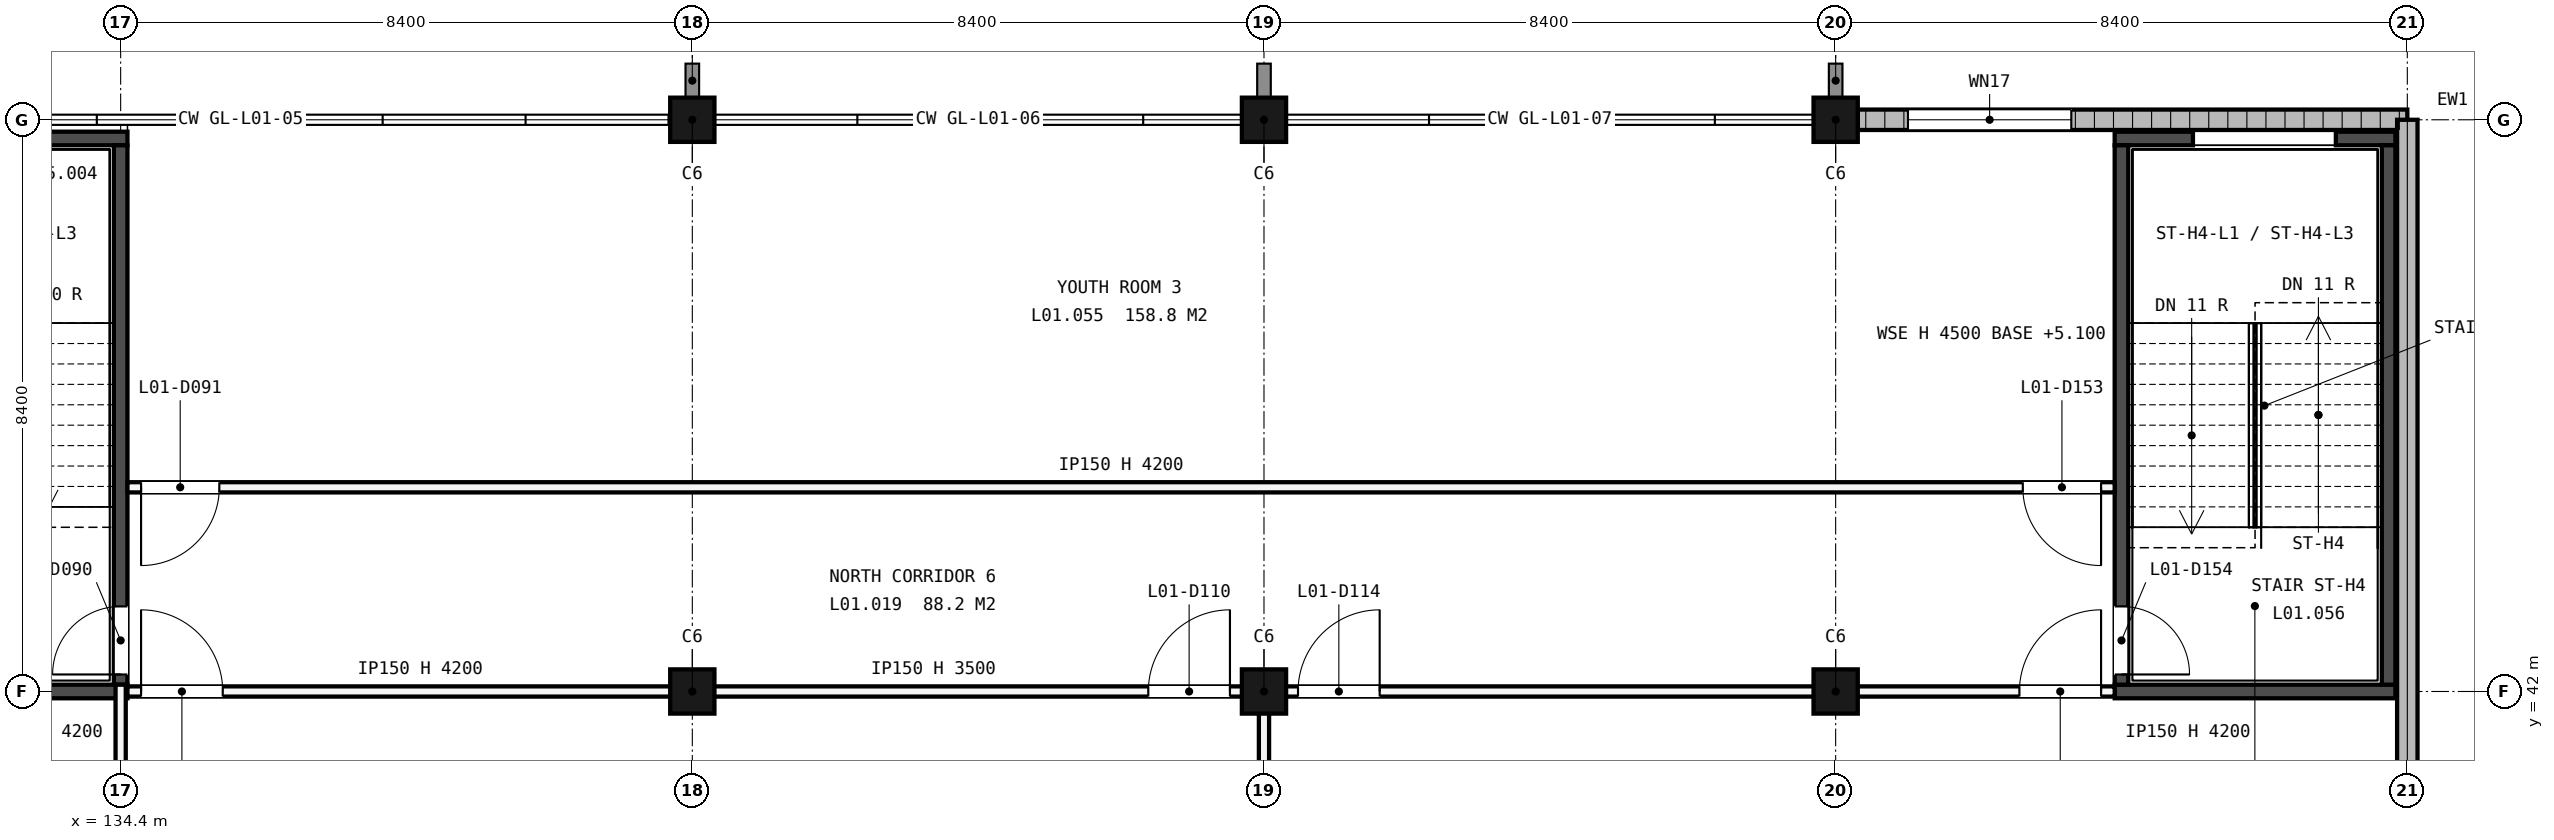
"""IFC4 building model, lengths in metres.
Left out: names, types, materials, properties, quantities, classifications, styles, units other than length and angle.
Written with IfcOpenShell. Run it as: python <this file> out.ifc"""

import sys

from ifc_helpers import new_model, si_unit, direction, frame, frame_2d, origin, origin_2d, place, context, subcontext, project, spatial, rectangle, extrude, element, fill, save


model = new_model("IFC4")
c1 = context("Model", 3, precision=1e-05, world=origin(), true_north=direction((0.0, 1.0)))
c2 = subcontext(c1, "Body", "Model", "MODEL_VIEW")
j1 = project(units=[si_unit("LENGTHUNIT", "METRE"), si_unit("PLANEANGLEUNIT", "RADIAN")], contexts=[c1])
p1 = place(None, origin())
s1 = spatial("IfcSite", under=j1, at=p1, CompositionType="ELEMENT")
p2 = place(p1, origin())
s2 = spatial("IfcBuilding", under=s1, at=p2, CompositionType="ELEMENT")
p3 = place(p2, frame((0.0, 0.0, 5.4)))
s3 = spatial("IfcBuildingStorey", under=s2, at=p3, CompositionType="ELEMENT", Elevation=5.4)
for number, where, z_axis, x_axis in (
    (1, (142.8, 42.0, -0.3), (0.0, 0.0, 1.0), (1.0, 0.0, 0.0)),
    (2, (142.8, 50.4, -0.3), (0.0, 0.0, 1.0), (1.0, 0.0, 0.0)),
    (3, (151.2, 42.0, -0.3), (0.0, 0.0, 1.0), (1.0, 0.0, 0.0)),
    (4, (151.2, 50.4, -0.3), (0.0, 0.0, 1.0), (1.0, 0.0, 0.0)),
    (5, (159.6, 42.0, -0.3), (0.0, 0.0, 1.0), (1.0, 0.0, 0.0)),
    (6, (159.6, 50.4, -0.3), (0.0, 0.0, 1.0), (1.0, 0.0, 0.0)),
):
    element("IfcColumn", number, at=place(p3, frame(where, z_axis=z_axis, x_axis=x_axis)), inside=s3, PredefinedType="COLUMN", context=c2, shape_type="SweptSolid", body=[
        extrude(rectangle(XDim=0.65, YDim=0.65, at=origin_2d()), origin(), (0.0, 0.0, 1.0), 4.55),
    ])
p4 = place(p3, frame((159.925, 50.4, 0.0), z_axis=(0.0, 0.0, 1.0), x_axis=(1.0, 0.0, 0.0)))
e7 = element("IfcWall", 7, at=p4, inside=s3, PredefinedType="STANDARD", context=c2, shape_type="SweptSolid", body=[
    extrude(rectangle(XDim=8.075, YDim=0.3, at=frame_2d((4.038, 0.0))), origin(), (0.0, 0.0, 1.0), 4.2),
])
p5 = place(p4, frame((0.738, 0.0, 0.9)))
e8 = element("IfcOpeningElement", 8, at=p5, cuts=e7, PredefinedType="OPENING", context=c2, shape_type="SweptSolid", body=[
    extrude(rectangle(XDim=2.4, YDim=1.5, at=frame_2d((1.2, 0.75))), frame((0.0, 0.16, 0.0), z_axis=(0.0, -1.0, 0.0), x_axis=(1.0, 0.0, 0.0)), (0.0, 0.0, 1.0), 0.32),
])
p6 = place(p3, frame((168.0, 33.925, 0.0), z_axis=(0.0, 0.0, 1.0), x_axis=(0.0, 1.0, 0.0)))
e9 = element("IfcWall", 9, at=p6, inside=s3, PredefinedType="STANDARD", context=c2, shape_type="SweptSolid", body=[
    extrude(rectangle(XDim=16.475, YDim=0.3, at=frame_2d((8.237, 0.0))), origin(), (0.0, 0.0, 1.0), 4.2),
])
p7 = place(p6, frame((1.938, 0.0, 2.4)))
e10 = element("IfcOpeningElement", 10, at=p7, cuts=e9, PredefinedType="OPENING", context=c2, shape_type="SweptSolid", body=[
    extrude(rectangle(XDim=4.2, YDim=0.9, at=frame_2d((2.1, 0.45))), frame((0.0, 0.16, 0.0), z_axis=(0.0, -1.0, 0.0), x_axis=(1.0, 0.0, 0.0)), (0.0, 0.0, 1.0), 0.32),
])
for number, where, z_axis, x_axis in (
    (11, (130.1, 42.0, -0.3), (0.0, 0.0, 1.0), (1.0, 0.0, 0.0)),
    (12, (130.1, 50.125, -0.3), (0.0, 0.0, 1.0), (1.0, 0.0, 0.0)),
):
    element("IfcWall", number, at=place(p3, frame(where, z_axis=z_axis, x_axis=x_axis)), inside=s3, PredefinedType="SHEAR", context=c2, shape_type="SweptSolid", body=[
        extrude(rectangle(XDim=4.4, YDim=0.2, at=frame_2d((2.2, 0.0))), origin(), (0.0, 0.0, 1.0), 4.5),
    ])
p8 = place(p3, frame((134.4, 42.1, -0.3), z_axis=(0.0, 0.0, 1.0), x_axis=(0.0, 1.0, 0.0)))
e13 = element("IfcWall", 13, at=p8, inside=s3, PredefinedType="SHEAR", context=c2, shape_type="SweptSolid", body=[
    extrude(rectangle(XDim=7.925, YDim=0.2, at=frame_2d((3.962, 0.0))), origin(), (0.0, 0.0, 1.0), 4.5),
])
p9 = place(p8, frame((0.15, 0.0, 0.3)))
e14 = element("IfcOpeningElement", 14, at=p9, cuts=e13, PredefinedType="OPENING", context=c2, shape_type="SweptSolid", body=[
    extrude(rectangle(XDim=1.0, YDim=2.1, at=frame_2d((0.5, 1.05))), frame((0.0, 0.11, 0.0), z_axis=(0.0, -1.0, 0.0), x_axis=(1.0, 0.0, 0.0)), (0.0, 0.0, 1.0), 0.22),
])
p10 = place(p3, frame((163.7, 42.0, -0.3), z_axis=(0.0, 0.0, 1.0), x_axis=(1.0, 0.0, 0.0)))
e15 = element("IfcWall", 15, at=p10, inside=s3, PredefinedType="SHEAR", context=c2, shape_type="SweptSolid", body=[
    extrude(rectangle(XDim=4.125, YDim=0.2, at=frame_2d((2.062, 0.0))), origin(), (0.0, 0.0, 1.0), 4.5),
])
p11 = place(p3, frame((163.7, 50.125, -0.3), z_axis=(0.0, 0.0, 1.0), x_axis=(1.0, 0.0, 0.0)))
e16 = element("IfcWall", 16, at=p11, inside=s3, PredefinedType="SHEAR", context=c2, shape_type="SweptSolid", body=[
    extrude(rectangle(XDim=1.15, YDim=0.2, at=frame_2d((0.575, 0.0))), origin(), (0.0, 0.0, 1.0), 4.5),
])
p12 = place(p3, frame((166.95, 50.125, -0.3), z_axis=(0.0, 0.0, 1.0), x_axis=(1.0, 0.0, 0.0)))
e17 = element("IfcWall", 17, at=p12, inside=s3, PredefinedType="SHEAR", context=c2, shape_type="SweptSolid", body=[
    extrude(rectangle(XDim=0.875, YDim=0.2, at=frame_2d((0.438, 0.0))), origin(), (0.0, 0.0, 1.0), 4.5),
])
p13 = place(p3, frame((163.8, 42.1, -0.3), z_axis=(0.0, 0.0, 1.0), x_axis=(0.0, 1.0, 0.0)))
e18 = element("IfcWall", 18, at=p13, inside=s3, PredefinedType="SHEAR", context=c2, shape_type="SweptSolid", body=[
    extrude(rectangle(XDim=7.925, YDim=0.2, at=frame_2d((3.962, 0.0))), origin(), (0.0, 0.0, 1.0), 4.5),
])
p14 = place(p13, frame((0.15, 0.0, 0.3)))
e19 = element("IfcOpeningElement", 19, at=p14, cuts=e18, PredefinedType="OPENING", context=c2, shape_type="SweptSolid", body=[
    extrude(rectangle(XDim=1.0, YDim=2.1, at=frame_2d((0.5, 1.05))), frame((0.0, 0.11, 0.0), z_axis=(0.0, -1.0, 0.0), x_axis=(1.0, 0.0, 0.0)), (0.0, 0.0, 1.0), 0.22),
])
p15 = place(p3, frame((167.725, 42.1, -0.3), z_axis=(0.0, 0.0, 1.0), x_axis=(0.0, 1.0, 0.0)))
e20 = element("IfcWall", 20, at=p15, inside=s3, PredefinedType="SHEAR", context=c2, shape_type="SweptSolid", body=[
    extrude(rectangle(XDim=7.925, YDim=0.2, at=frame_2d((3.962, 0.0))), origin(), (0.0, 0.0, 1.0), 4.5),
])
p16 = place(p3, frame((134.5, 42.0, 0.0), z_axis=(0.0, 0.0, 1.0), x_axis=(1.0, 0.0, 0.0)))
e21 = element("IfcWall", 21, at=p16, inside=s3, PredefinedType="PARTITIONING", context=c2, shape_type="SweptSolid", body=[
    extrude(rectangle(XDim=8.605, YDim=0.15, at=frame_2d((4.302, 0.0))), origin(), (0.0, 0.0, 1.0), 4.2),
])
p17 = place(p16, frame((0.2, 0.0, 0.0)))
e22 = element("IfcOpeningElement", 22, at=p17, cuts=e21, PredefinedType="OPENING", context=c2, shape_type="SweptSolid", body=[
    extrude(rectangle(XDim=1.2, YDim=2.1, at=frame_2d((0.6, 1.05))), frame((0.0, 0.085, 0.0), z_axis=(0.0, -1.0, 0.0), x_axis=(1.0, 0.0, 0.0)), (0.0, 0.0, 1.0), 0.17),
])
p18 = place(p3, frame((143.105, 42.0, 0.0), z_axis=(0.0, 0.0, 1.0), x_axis=(1.0, 0.0, 0.0)))
e23 = element("IfcWall", 23, at=p18, inside=s3, PredefinedType="PARTITIONING", context=c2, shape_type="SweptSolid", body=[
    extrude(rectangle(XDim=16.19, YDim=0.15, at=frame_2d((8.095, 0.0))), origin(), (0.0, 0.0, 1.0), 3.5),
])
p19 = place(p18, frame((6.395, 0.0, 0.0)))
e24 = element("IfcOpeningElement", 24, at=p19, cuts=e23, PredefinedType="OPENING", context=c2, shape_type="SweptSolid", body=[
    extrude(rectangle(XDim=1.2, YDim=2.1, at=frame_2d((0.6, 1.05))), frame((0.0, 0.085, 0.0), z_axis=(0.0, -1.0, 0.0), x_axis=(1.0, 0.0, 0.0)), (0.0, 0.0, 1.0), 0.17),
])
p20 = place(p18, frame((8.595, 0.0, 0.0)))
e25 = element("IfcOpeningElement", 25, at=p20, cuts=e23, PredefinedType="OPENING", context=c2, shape_type="SweptSolid", body=[
    extrude(rectangle(XDim=1.2, YDim=2.1, at=frame_2d((0.6, 1.05))), frame((0.0, 0.085, 0.0), z_axis=(0.0, -1.0, 0.0), x_axis=(1.0, 0.0, 0.0)), (0.0, 0.0, 1.0), 0.17),
])
p21 = place(p3, frame((159.295, 42.0, 0.0), z_axis=(0.0, 0.0, 1.0), x_axis=(1.0, 0.0, 0.0)))
e26 = element("IfcWall", 26, at=p21, inside=s3, PredefinedType="PARTITIONING", context=c2, shape_type="SweptSolid", body=[
    extrude(rectangle(XDim=4.405, YDim=0.15, at=frame_2d((2.203, 0.0))), origin(), (0.0, 0.0, 1.0), 4.2),
])
p22 = place(p21, frame((3.005, 0.0, 0.0)))
e27 = element("IfcOpeningElement", 27, at=p22, cuts=e26, PredefinedType="OPENING", context=c2, shape_type="SweptSolid", body=[
    extrude(rectangle(XDim=1.2, YDim=2.1, at=frame_2d((0.6, 1.05))), frame((0.0, 0.085, 0.0), z_axis=(0.0, -1.0, 0.0), x_axis=(1.0, 0.0, 0.0)), (0.0, 0.0, 1.0), 0.17),
])
p23 = place(p3, frame((134.5, 45.0, 0.0), z_axis=(0.0, 0.0, 1.0), x_axis=(1.0, 0.0, 0.0)))
e28 = element("IfcWall", 28, at=p23, inside=s3, PredefinedType="PARTITIONING", context=c2, shape_type="SweptSolid", body=[
    extrude(rectangle(XDim=29.2, YDim=0.15, at=frame_2d((14.6, 0.0))), origin(), (0.0, 0.0, 1.0), 4.2),
])
p24 = place(p23, frame((0.2, 0.0, 0.0)))
e29 = element("IfcOpeningElement", 29, at=p24, cuts=e28, PredefinedType="OPENING", context=c2, shape_type="SweptSolid", body=[
    extrude(rectangle(XDim=1.15, YDim=2.1, at=frame_2d((0.575, 1.05))), frame((0.0, 0.085, 0.0), z_axis=(0.0, -1.0, 0.0), x_axis=(1.0, 0.0, 0.0)), (0.0, 0.0, 1.0), 0.17),
])
p25 = place(p23, frame((27.85, 0.0, 0.0)))
e30 = element("IfcOpeningElement", 30, at=p25, cuts=e28, PredefinedType="OPENING", context=c2, shape_type="SweptSolid", body=[
    extrude(rectangle(XDim=1.15, YDim=2.1, at=frame_2d((0.575, 1.05))), frame((0.0, 0.085, 0.0), z_axis=(0.0, -1.0, 0.0), x_axis=(1.0, 0.0, 0.0)), (0.0, 0.0, 1.0), 0.17),
])
p26 = place(p3, frame((134.4, 33.295, 0.0), z_axis=(0.0, 0.0, 1.0), x_axis=(0.0, 1.0, 0.0)))
e31 = element("IfcWall", 31, at=p26, inside=s3, PredefinedType="PARTITIONING", context=c2, shape_type="SweptSolid", body=[
    extrude(rectangle(XDim=8.805, YDim=0.15, at=frame_2d((4.403, 0.0))), origin(), (0.0, 0.0, 1.0), 4.2),
])
p27 = place(p3, frame((151.2, 27.675, 0.0), z_axis=(0.0, 0.0, 1.0), x_axis=(0.0, 1.0, 0.0)))
e32 = element("IfcWall", 32, at=p27, inside=s3, PredefinedType="PARTITIONING", context=c2, shape_type="SweptSolid", body=[
    extrude(rectangle(XDim=14.25, YDim=0.15, at=frame_2d((7.125, 0.0))), origin(), (0.0, 0.0, 1.0), 3.5),
])
p28 = place(p5, origin())
e33 = element("IfcWindow", 33, at=p28, inside=s3, PartitioningType="SINGLE_PANEL", PredefinedType="WINDOW", context=c2, shape_type="SweptSolid", body=[
    extrude(rectangle(XDim=2.4, YDim=1.5, at=frame_2d((1.2, 0.75))), frame((0.0, 0.03, 0.0), z_axis=(0.0, -1.0, 0.0), x_axis=(1.0, 0.0, 0.0)), (0.0, 0.0, 1.0), 0.06),
])
fill(e8, e33)
p29 = place(p9, origin())
e34 = element("IfcDoor", 34, at=p29, inside=s3, OperationType="SINGLE_SWING_RIGHT", PredefinedType="DOOR", context=c2, shape_type="SweptSolid", body=[
    extrude(rectangle(XDim=1.0, YDim=2.1, at=frame_2d((0.5, 1.05))), frame((0.0, 0.025, 0.0), z_axis=(0.0, -1.0, 0.0), x_axis=(1.0, 0.0, 0.0)), (0.0, 0.0, 1.0), 0.05),
])
fill(e14, e34)
p30 = place(p14, origin())
e35 = element("IfcDoor", 35, at=p30, inside=s3, OperationType="SINGLE_SWING_LEFT", PredefinedType="DOOR", context=c2, shape_type="SweptSolid", body=[
    extrude(rectangle(XDim=1.0, YDim=2.1, at=frame_2d((0.5, 1.05))), frame((0.0, 0.025, 0.0), z_axis=(0.0, -1.0, 0.0), x_axis=(1.0, 0.0, 0.0)), (0.0, 0.0, 1.0), 0.05),
])
fill(e19, e35)
p31 = place(p17, origin())
e36 = element("IfcDoor", 36, at=p31, inside=s3, OperationType="SINGLE_SWING_RIGHT", PredefinedType="DOOR", context=c2, shape_type="SweptSolid", body=[
    extrude(rectangle(XDim=1.2, YDim=2.1, at=frame_2d((0.6, 1.05))), frame((0.0, 0.025, 0.0), z_axis=(0.0, -1.0, 0.0), x_axis=(1.0, 0.0, 0.0)), (0.0, 0.0, 1.0), 0.05),
])
fill(e22, e36)
p32 = place(p19, origin())
e37 = element("IfcDoor", 37, at=p32, inside=s3, OperationType="SINGLE_SWING_LEFT", PredefinedType="DOOR", context=c2, shape_type="SweptSolid", body=[
    extrude(rectangle(XDim=1.2, YDim=2.1, at=frame_2d((0.6, 1.05))), frame((0.0, 0.025, 0.0), z_axis=(0.0, -1.0, 0.0), x_axis=(1.0, 0.0, 0.0)), (0.0, 0.0, 1.0), 0.05),
])
fill(e24, e37)
p33 = place(p20, origin())
e38 = element("IfcDoor", 38, at=p33, inside=s3, OperationType="SINGLE_SWING_LEFT", PredefinedType="DOOR", context=c2, shape_type="SweptSolid", body=[
    extrude(rectangle(XDim=1.2, YDim=2.1, at=frame_2d((0.6, 1.05))), frame((0.0, 0.025, 0.0), z_axis=(0.0, -1.0, 0.0), x_axis=(1.0, 0.0, 0.0)), (0.0, 0.0, 1.0), 0.05),
])
fill(e25, e38)
p34 = place(p22, origin())
e39 = element("IfcDoor", 39, at=p34, inside=s3, OperationType="SINGLE_SWING_LEFT", PredefinedType="DOOR", context=c2, shape_type="SweptSolid", body=[
    extrude(rectangle(XDim=1.2, YDim=2.1, at=frame_2d((0.6, 1.05))), frame((0.0, 0.025, 0.0), z_axis=(0.0, -1.0, 0.0), x_axis=(1.0, 0.0, 0.0)), (0.0, 0.0, 1.0), 0.05),
])
fill(e27, e39)
p35 = place(p24, origin())
e40 = element("IfcDoor", 40, at=p35, inside=s3, OperationType="SINGLE_SWING_LEFT", PredefinedType="DOOR", context=c2, shape_type="SweptSolid", body=[
    extrude(rectangle(XDim=1.15, YDim=2.1, at=frame_2d((0.575, 1.05))), frame((0.0, 0.025, 0.0), z_axis=(0.0, -1.0, 0.0), x_axis=(1.0, 0.0, 0.0)), (0.0, 0.0, 1.0), 0.05),
])
fill(e29, e40)
p36 = place(p25, origin())
e41 = element("IfcDoor", 41, at=p36, inside=s3, OperationType="SINGLE_SWING_RIGHT", PredefinedType="DOOR", context=c2, shape_type="SweptSolid", body=[
    extrude(rectangle(XDim=1.15, YDim=2.1, at=frame_2d((0.575, 1.05))), frame((0.0, 0.025, 0.0), z_axis=(0.0, -1.0, 0.0), x_axis=(1.0, 0.0, 0.0)), (0.0, 0.0, 1.0), 0.05),
])
fill(e30, e41)
save(model, sys.argv[1])
